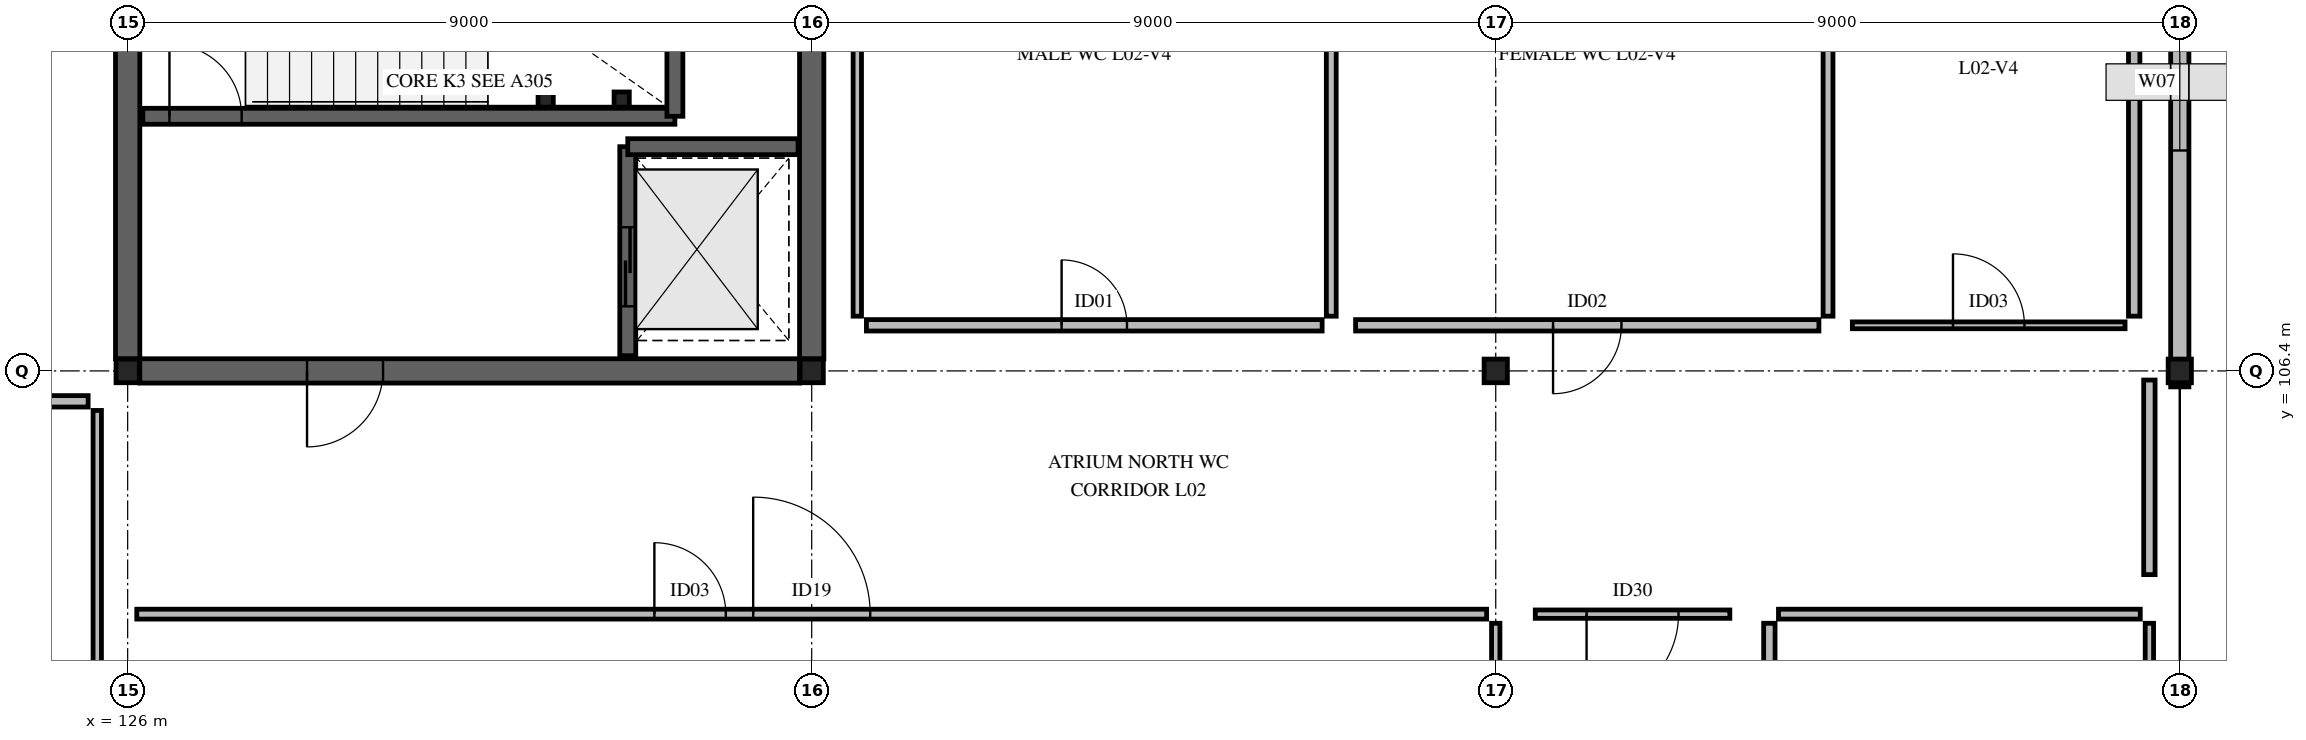
"""IFC4 building model, lengths in metres.
Left out: names, types, materials, properties, quantities, classifications, styles, units other than length and angle.
Written with IfcOpenShell. Run it as: python <this file> out.ifc"""

import sys

from ifc_helpers import new_model, si_unit, direction, frame, frame_2d, origin, origin_2d, place, context, subcontext, project, spatial, rectangle, hollow_rectangle, i_section, extrude, element, fill, save


model = new_model("IFC4")
c1 = context("Model", 3, precision=1e-05, world=origin(), true_north=direction((0.0, 1.0)))
c2 = subcontext(c1, "Body", "Model", "MODEL_VIEW")
j1 = project(units=[si_unit("LENGTHUNIT", "METRE"), si_unit("PLANEANGLEUNIT", "RADIAN")], contexts=[c1])
p1 = place(None, origin())
s1 = spatial("IfcSite", under=j1, at=p1, CompositionType="ELEMENT")
p2 = place(p1, origin())
s2 = spatial("IfcBuilding", under=s1, at=p2, CompositionType="ELEMENT")
p3 = place(p2, frame((0.0, 0.0, 9.36)))
s3 = spatial("IfcBuildingStorey", under=s2, at=p3, CompositionType="ELEMENT", Elevation=9.36)
for number, where, z_axis, x_axis in (
    (1, (126.0, 106.4, 0.0), (0.0, 0.0, 1.0), (1.0, 0.0, 0.0)),
    (2, (135.0, 106.4, 0.0), (0.0, 0.0, 1.0), (1.0, 0.0, 0.0)),
    (3, (144.0, 106.4, 0.0), (0.0, 0.0, 1.0), (1.0, 0.0, 0.0)),
    (4, (153.0, 106.4, 0.0), (0.0, 0.0, 1.0), (1.0, 0.0, 0.0)),
):
    element("IfcColumn", number, at=place(p3, frame(where, z_axis=z_axis, x_axis=x_axis)), inside=s3, PredefinedType="COLUMN", context=c2, shape_type="SweptSolid", body=[
        extrude(i_section(OverallWidth=0.306, OverallDepth=0.311, WebThickness=0.011, FlangeThickness=0.017, FilletRadius=0.015, at=origin_2d()), origin(), (0.0, 0.0, 1.0), 4.32),
    ])
p4 = place(p3, frame((153.0, 106.19, 0.0), z_axis=(0.0, 0.0, 1.0), x_axis=(0.0, 1.0, 0.0)))
e5 = element("IfcWall", 5, at=p4, inside=s3, PredefinedType="STANDARD", context=c2, shape_type="SweptSolid", body=[
    extrude(rectangle(XDim=7.81, YDim=0.24, at=frame_2d((3.905, 0.0))), origin(), (0.0, 0.0, 1.0), 3.788),
])
p5 = place(p4, frame((3.11, 0.0, 0.85)))
e6 = element("IfcOpeningElement", 6, at=p5, cuts=e5, PredefinedType="OPENING", context=c2, shape_type="SweptSolid", body=[
    extrude(rectangle(XDim=1.8, YDim=1.2, at=frame_2d((0.9, 0.6))), frame((0.0, 0.13, 0.0), z_axis=(0.0, -1.0, 0.0), x_axis=(1.0, 0.0, 0.0)), (0.0, 0.0, 1.0), 0.26),
])
p6 = place(p3, frame((126.16, 106.4, 0.0), z_axis=(0.0, 0.0, 1.0), x_axis=(1.0, 0.0, 0.0)))
e7 = element("IfcWall", 7, at=p6, inside=s3, PredefinedType="SHEAR", context=c2, shape_type="SweptSolid", body=[
    extrude(rectangle(XDim=8.68, YDim=0.32, at=frame_2d((4.34, 0.0))), origin(), (0.0, 0.0, 1.0), 4.04),
])
p7 = place(p6, frame((2.2, 0.0, 0.0)))
e8 = element("IfcOpeningElement", 8, at=p7, cuts=e7, PredefinedType="OPENING", context=c2, shape_type="SweptSolid", body=[
    extrude(rectangle(XDim=1.0, YDim=2.15, at=frame_2d((0.5, 1.075))), frame((0.0, 0.17, 0.0), z_axis=(0.0, -1.0, 0.0), x_axis=(1.0, 0.0, 0.0)), (0.0, 0.0, 1.0), 0.34),
])
for number, where, z_axis, x_axis in (
    (9, (126.0, 106.56, 0.0), (0.0, 0.0, 1.0), (0.0, 1.0, 0.0)),
    (10, (135.0, 106.56, 0.0), (0.0, 0.0, 1.0), (0.0, 1.0, 0.0)),
):
    element("IfcWall", number, at=place(p3, frame(where, z_axis=z_axis, x_axis=x_axis)), inside=s3, PredefinedType="SHEAR", context=c2, shape_type="SweptSolid", body=[
        extrude(rectangle(XDim=7.28, YDim=0.32, at=frame_2d((3.64, 0.0))), origin(), (0.0, 0.0, 1.0), 4.04),
    ])
p8 = place(p3, frame((126.2, 109.75, 0.0), z_axis=(0.0, 0.0, 1.0), x_axis=(1.0, 0.0, 0.0)))
e11 = element("IfcWall", 11, at=p8, inside=s3, PredefinedType="SOLIDWALL", context=c2, shape_type="SweptSolid", body=[
    extrude(rectangle(XDim=7.0, YDim=0.21, at=frame_2d((3.5, 0.0))), origin(), (0.0, 0.0, 1.0), 4.04),
])
p9 = place(p8, frame((0.35, 0.0, 0.0)))
e12 = element("IfcOpeningElement", 12, at=p9, cuts=e11, PredefinedType="OPENING", context=c2, shape_type="SweptSolid", body=[
    extrude(rectangle(XDim=0.95, YDim=2.12, at=frame_2d((0.475, 1.06))), frame((0.0, 0.115, 0.0), z_axis=(0.0, -1.0, 0.0), x_axis=(1.0, 0.0, 0.0)), (0.0, 0.0, 1.0), 0.23),
])
p10 = place(p3, frame((133.2, 109.75, 0.0), z_axis=(0.0, 0.0, 1.0), x_axis=(0.0, 1.0, 0.0)))
e13 = element("IfcWall", 13, at=p10, inside=s3, PredefinedType="SOLIDWALL", context=c2, shape_type="SweptSolid", body=[
    extrude(rectangle(XDim=4.05, YDim=0.21, at=frame_2d((2.025, 0.0))), origin(), (0.0, 0.0, 1.0), 4.04),
])
p11 = place(p3, frame((132.58, 106.6, 0.0), z_axis=(0.0, 0.0, 1.0), x_axis=(0.0, 1.0, 0.0)))
e14 = element("IfcWall", 14, at=p11, inside=s3, PredefinedType="SOLIDWALL", context=c2, shape_type="SweptSolid", body=[
    extrude(rectangle(XDim=2.75, YDim=0.21, at=frame_2d((1.375, 0.0))), origin(), (0.0, 0.0, 1.0), 4.04),
])
p12 = place(p11, frame((0.65, 0.0, 0.0)))
e15 = element("IfcOpeningElement", 15, at=p12, cuts=e14, PredefinedType="OPENING", context=c2, shape_type="SweptSolid", body=[
    extrude(rectangle(XDim=1.04, YDim=2.1, at=frame_2d((0.52, 1.05))), frame((0.0, 0.115, 0.0), z_axis=(0.0, -1.0, 0.0), x_axis=(1.0, 0.0, 0.0)), (0.0, 0.0, 1.0), 0.23),
])
p13 = place(p3, frame((132.58, 109.35, 0.0), z_axis=(0.0, 0.0, 1.0), x_axis=(1.0, 0.0, 0.0)))
e16 = element("IfcWall", 16, at=p13, inside=s3, PredefinedType="SOLIDWALL", context=c2, shape_type="SweptSolid", body=[
    extrude(rectangle(XDim=2.24, YDim=0.21, at=frame_2d((1.12, 0.0))), origin(), (0.0, 0.0, 1.0), 4.04),
])
for number, where, z_axis, x_axis in (
    (17, (131.5, 109.97, 0.0), (0.0, 0.0, 1.0), (1.0, 0.0, 0.0)),
    (18, (132.5, 109.97, 0.0), (0.0, 0.0, 1.0), (1.0, 0.0, 0.0)),
):
    element("IfcColumn", number, at=place(p3, frame(where, z_axis=z_axis, x_axis=x_axis)), inside=s3, PredefinedType="COLUMN", context=c2, shape_type="SweptSolid", body=[
        extrude(hollow_rectangle(XDim=0.2, YDim=0.2, WallThickness=0.012, at=origin_2d()), origin(), (0.0, 0.0, 1.0), 4.32),
    ])
p14 = place(p3, frame((125.6, 76.12, 0.0), z_axis=(0.0, 0.0, 1.0), x_axis=(0.0, 1.0, 0.0)))
e19 = element("IfcWall", 19, at=p14, inside=s3, PredefinedType="PARTITIONING", context=c2, shape_type="SweptSolid", body=[
    extrude(rectangle(XDim=29.76, YDim=0.11, at=frame_2d((14.88, 0.0))), origin(), (0.0, 0.0, 1.0), 4.04),
])
p15 = place(p14, frame((12.55, 0.0, 0.0)))
e20 = element("IfcOpeningElement", 20, at=p15, cuts=e19, PredefinedType="OPENING", context=c2, shape_type="SweptSolid", body=[
    extrude(rectangle(XDim=1.46, YDim=2.1, at=frame_2d((0.73, 1.05))), frame((0.0, 0.065, 0.0), z_axis=(0.0, -1.0, 0.0), x_axis=(1.0, 0.0, 0.0)), (0.0, 0.0, 1.0), 0.13),
])
p16 = place(p3, frame((115.12, 106.0, 0.0), z_axis=(0.0, 0.0, 1.0), x_axis=(1.0, 0.0, 0.0)))
e21 = element("IfcWall", 21, at=p16, inside=s3, PredefinedType="PARTITIONING", context=c2, shape_type="SweptSolid", body=[
    extrude(rectangle(XDim=10.36, YDim=0.15, at=frame_2d((5.18, 0.0))), origin(), (0.0, 0.0, 1.0), 4.04),
])
p17 = place(p3, frame((126.12, 103.2, 0.0), z_axis=(0.0, 0.0, 1.0), x_axis=(1.0, 0.0, 0.0)))
e22 = element("IfcWall", 22, at=p17, inside=s3, PredefinedType="PARTITIONING", context=c2, shape_type="SweptSolid", body=[
    extrude(rectangle(XDim=17.76, YDim=0.13, at=frame_2d((8.88, 0.0))), origin(), (0.0, 0.0, 1.0), 4.04),
])
p18 = place(p17, frame((8.11, 0.0, 0.0)))
e23 = element("IfcOpeningElement", 23, at=p18, cuts=e22, PredefinedType="OPENING", context=c2, shape_type="SweptSolid", body=[
    extrude(rectangle(XDim=1.54, YDim=2.1, at=frame_2d((0.77, 1.05))), frame((0.0, 0.075, 0.0), z_axis=(0.0, -1.0, 0.0), x_axis=(1.0, 0.0, 0.0)), (0.0, 0.0, 1.0), 0.15),
])
p19 = place(p17, frame((6.81, 0.0, 0.0)))
e24 = element("IfcOpeningElement", 24, at=p19, cuts=e22, PredefinedType="OPENING", context=c2, shape_type="SweptSolid", body=[
    extrude(rectangle(XDim=0.94, YDim=2.06, at=frame_2d((0.47, 1.03))), frame((0.0, 0.075, 0.0), z_axis=(0.0, -1.0, 0.0), x_axis=(1.0, 0.0, 0.0)), (0.0, 0.0, 1.0), 0.15),
])
p20 = place(p3, frame((144.0, 91.72, 0.0), z_axis=(0.0, 0.0, 1.0), x_axis=(0.0, 1.0, 0.0)))
e25 = element("IfcWall", 25, at=p20, inside=s3, PredefinedType="PARTITIONING", context=c2, shape_type="SweptSolid", body=[
    extrude(rectangle(XDim=11.36, YDim=0.11, at=frame_2d((5.68, 0.0))), origin(), (0.0, 0.0, 1.0), 3.631),
])
p21 = place(p3, frame((147.6, 61.32, 0.0), z_axis=(0.0, 0.0, 1.0), x_axis=(0.0, 1.0, 0.0)))
e26 = element("IfcWall", 26, at=p21, inside=s3, PredefinedType="PARTITIONING", context=c2, shape_type="SweptSolid", body=[
    extrude(rectangle(XDim=41.76, YDim=0.15, at=frame_2d((20.88, 0.0))), origin(), (0.0, 0.0, 1.0), 4.04),
])
p22 = place(p21, frame((20.06, 0.0, 0.0)))
e27 = element("IfcOpeningElement", 27, at=p22, cuts=e26, PredefinedType="OPENING", context=c2, shape_type="SweptSolid", body=[
    extrude(rectangle(XDim=1.0, YDim=2.15, at=frame_2d((0.5, 1.075))), frame((0.0, 0.085, 0.0), z_axis=(0.0, -1.0, 0.0), x_axis=(1.0, 0.0, 0.0)), (0.0, 0.0, 1.0), 0.17),
])
p23 = place(p3, frame((147.72, 103.2, 0.0), z_axis=(0.0, 0.0, 1.0), x_axis=(1.0, 0.0, 0.0)))
e28 = element("IfcWall", 28, at=p23, inside=s3, PredefinedType="PARTITIONING", context=c2, shape_type="SweptSolid", body=[
    extrude(rectangle(XDim=4.76, YDim=0.13, at=frame_2d((2.38, 0.0))), origin(), (0.0, 0.0, 1.0), 4.04),
])
p24 = place(p3, frame((152.6, 61.32, 0.0), z_axis=(0.0, 0.0, 1.0), x_axis=(0.0, 1.0, 0.0)))
e29 = element("IfcWall", 29, at=p24, inside=s3, PredefinedType="PARTITIONING", context=c2, shape_type="SweptSolid", body=[
    extrude(rectangle(XDim=41.76, YDim=0.11, at=frame_2d((20.88, 0.0))), origin(), (0.0, 0.0, 1.0), 4.04),
])
p25 = place(p3, frame((135.72, 107.0, 0.0), z_axis=(0.0, 0.0, 1.0), x_axis=(1.0, 0.0, 0.0)))
e30 = element("IfcWall", 30, at=p25, inside=s3, PredefinedType="PARTITIONING", context=c2, shape_type="SweptSolid", body=[
    extrude(rectangle(XDim=5.996, YDim=0.15, at=frame_2d((2.998, 0.0))), origin(), (0.0, 0.0, 1.0), 4.04),
])
p26 = place(p25, frame((2.568, 0.0, 0.0)))
e31 = element("IfcOpeningElement", 31, at=p26, cuts=e30, PredefinedType="OPENING", context=c2, shape_type="SweptSolid", body=[
    extrude(rectangle(XDim=0.86, YDim=2.06, at=frame_2d((0.43, 1.03))), frame((0.0, 0.085, 0.0), z_axis=(0.0, -1.0, 0.0), x_axis=(1.0, 0.0, 0.0)), (0.0, 0.0, 1.0), 0.17),
])
p27 = place(p3, frame((141.836, 107.12, 0.0), z_axis=(0.0, 0.0, 1.0), x_axis=(0.0, 1.0, 0.0)))
e32 = element("IfcWall", 32, at=p27, inside=s3, PredefinedType="PARTITIONING", context=c2, shape_type="SweptSolid", body=[
    extrude(rectangle(XDim=6.16, YDim=0.13, at=frame_2d((3.08, 0.0))), origin(), (0.0, 0.0, 1.0), 4.04),
])
p28 = place(p3, frame((135.6, 107.12, 0.0), z_axis=(0.0, 0.0, 1.0), x_axis=(0.0, 1.0, 0.0)))
e33 = element("IfcWall", 33, at=p28, inside=s3, PredefinedType="PARTITIONING", context=c2, shape_type="SweptSolid", body=[
    extrude(rectangle(XDim=6.16, YDim=0.11, at=frame_2d((3.08, 0.0))), origin(), (0.0, 0.0, 1.0), 4.04),
])
p29 = place(p3, frame((142.156, 107.0, 0.0), z_axis=(0.0, 0.0, 1.0), x_axis=(1.0, 0.0, 0.0)))
e34 = element("IfcWall", 34, at=p29, inside=s3, PredefinedType="PARTITIONING", context=c2, shape_type="SweptSolid", body=[
    extrude(rectangle(XDim=6.096, YDim=0.15, at=frame_2d((3.048, 0.0))), origin(), (0.0, 0.0, 1.0), 4.04),
])
p30 = place(p29, frame((2.598, 0.0, 0.0)))
e35 = element("IfcOpeningElement", 35, at=p30, cuts=e34, PredefinedType="OPENING", context=c2, shape_type="SweptSolid", body=[
    extrude(rectangle(XDim=0.9, YDim=2.06, at=frame_2d((0.45, 1.03))), frame((0.0, 0.085, 0.0), z_axis=(0.0, -1.0, 0.0), x_axis=(1.0, 0.0, 0.0)), (0.0, 0.0, 1.0), 0.17),
])
p31 = place(p3, frame((148.372, 107.12, 0.0), z_axis=(0.0, 0.0, 1.0), x_axis=(0.0, 1.0, 0.0)))
e36 = element("IfcWall", 36, at=p31, inside=s3, PredefinedType="PARTITIONING", context=c2, shape_type="SweptSolid", body=[
    extrude(rectangle(XDim=6.16, YDim=0.13, at=frame_2d((3.08, 0.0))), origin(), (0.0, 0.0, 1.0), 4.04),
])
p32 = place(p3, frame((148.692, 107.0, 0.0), z_axis=(0.0, 0.0, 1.0), x_axis=(1.0, 0.0, 0.0)))
e37 = element("IfcWall", 37, at=p32, inside=s3, PredefinedType="PARTITIONING", context=c2, shape_type="SweptSolid", body=[
    extrude(rectangle(XDim=3.588, YDim=0.09, at=frame_2d((1.794, 0.0))), origin(), (0.0, 0.0, 1.0), 4.04),
])
p33 = place(p32, frame((1.324, 0.0, 0.0)))
e38 = element("IfcOpeningElement", 38, at=p33, cuts=e37, PredefinedType="OPENING", context=c2, shape_type="SweptSolid", body=[
    extrude(rectangle(XDim=0.94, YDim=2.06, at=frame_2d((0.47, 1.03))), frame((0.0, 0.055, 0.0), z_axis=(0.0, -1.0, 0.0), x_axis=(1.0, 0.0, 0.0)), (0.0, 0.0, 1.0), 0.11),
])
p34 = place(p3, frame((152.4, 107.12, 0.0), z_axis=(0.0, 0.0, 1.0), x_axis=(0.0, 1.0, 0.0)))
e39 = element("IfcWall", 39, at=p34, inside=s3, PredefinedType="PARTITIONING", context=c2, shape_type="SweptSolid", body=[
    extrude(rectangle(XDim=6.16, YDim=0.15, at=frame_2d((3.08, 0.0))), origin(), (0.0, 0.0, 1.0), 4.04),
])
p35 = place(p3, frame((144.52, 103.2, 0.0), z_axis=(0.0, 0.0, 1.0), x_axis=(1.0, 0.0, 0.0)))
e40 = element("IfcWall", 40, at=p35, inside=s3, PredefinedType="PARTITIONING", context=c2, shape_type="SweptSolid", body=[
    extrude(rectangle(XDim=2.56, YDim=0.11, at=frame_2d((1.28, 0.0))), origin(), (0.0, 0.0, 1.0), 4.04),
])
p36 = place(p35, frame((0.675, 0.0, 0.0)))
e41 = element("IfcOpeningElement", 41, at=p36, cuts=e40, PredefinedType="OPENING", context=c2, shape_type="SweptSolid", body=[
    extrude(rectangle(XDim=1.21, YDim=2.15, at=frame_2d((0.605, 1.075))), frame((0.0, 0.065, 0.0), z_axis=(0.0, -1.0, 0.0), x_axis=(1.0, 0.0, 0.0)), (0.0, 0.0, 1.0), 0.13),
])
p37 = place(p3, frame((152.6, 103.72, 0.0), z_axis=(0.0, 0.0, 1.0), x_axis=(0.0, 1.0, 0.0)))
e42 = element("IfcWall", 42, at=p37, inside=s3, PredefinedType="PARTITIONING", context=c2, shape_type="SweptSolid", body=[
    extrude(rectangle(XDim=2.56, YDim=0.15, at=frame_2d((1.28, 0.0))), origin(), (0.0, 0.0, 1.0), 4.04),
])
p38 = place(p5, origin())
e43 = element("IfcWindow", 43, at=p38, inside=s3, PartitioningType="SINGLE_PANEL", PredefinedType="WINDOW", context=c2, shape_type="SweptSolid", body=[
    extrude(rectangle(XDim=1.8, YDim=1.2, at=frame_2d((0.9, 0.6))), frame((0.0, 0.03, 0.0), z_axis=(0.0, -1.0, 0.0), x_axis=(1.0, 0.0, 0.0)), (0.0, 0.0, 1.0), 0.06),
])
fill(e6, e43)
p39 = place(p9, origin())
e44 = element("IfcDoor", 44, at=p39, inside=s3, OperationType="SINGLE_SWING_LEFT", PredefinedType="DOOR", context=c2, shape_type="SweptSolid", body=[
    extrude(rectangle(XDim=0.95, YDim=2.12, at=frame_2d((0.475, 1.06))), frame((0.0, 0.025, 0.0), z_axis=(0.0, -1.0, 0.0), x_axis=(1.0, 0.0, 0.0)), (0.0, 0.0, 1.0), 0.05),
])
fill(e12, e44)
p40 = place(p12, origin())
e45 = element("IfcDoor", 45, at=p40, inside=s3, OperationType="SLIDING_TO_LEFT", PredefinedType="DOOR", context=c2, shape_type="SweptSolid", body=[
    extrude(rectangle(XDim=1.04, YDim=2.1, at=frame_2d((0.52, 1.05))), frame((0.0, 0.025, 0.0), z_axis=(0.0, -1.0, 0.0), x_axis=(1.0, 0.0, 0.0)), (0.0, 0.0, 1.0), 0.05),
])
fill(e15, e45)
p41 = place(p7, origin())
e46 = element("IfcDoor", 46, at=p41, inside=s3, OperationType="SINGLE_SWING_RIGHT", PredefinedType="DOOR", context=c2, shape_type="SweptSolid", body=[
    extrude(rectangle(XDim=1.0, YDim=2.15, at=frame_2d((0.5, 1.075))), frame((0.0, 0.025, 0.0), z_axis=(0.0, -1.0, 0.0), x_axis=(1.0, 0.0, 0.0)), (0.0, 0.0, 1.0), 0.05),
])
fill(e8, e46)
p42 = place(p18, origin())
e47 = element("IfcDoor", 47, at=p42, inside=s3, OperationType="SINGLE_SWING_LEFT", PredefinedType="DOOR", context=c2, shape_type="SweptSolid", body=[
    extrude(rectangle(XDim=1.54, YDim=2.1, at=frame_2d((0.77, 1.05))), frame((0.0, 0.025, 0.0), z_axis=(0.0, -1.0, 0.0), x_axis=(1.0, 0.0, 0.0)), (0.0, 0.0, 1.0), 0.05),
])
fill(e23, e47)
p43 = place(p26, origin())
e48 = element("IfcDoor", 48, at=p43, inside=s3, OperationType="SINGLE_SWING_LEFT", PredefinedType="DOOR", context=c2, shape_type="SweptSolid", body=[
    extrude(rectangle(XDim=0.86, YDim=2.06, at=frame_2d((0.43, 1.03))), frame((0.0, 0.025, 0.0), z_axis=(0.0, -1.0, 0.0), x_axis=(1.0, 0.0, 0.0)), (0.0, 0.0, 1.0), 0.05),
])
fill(e31, e48)
p44 = place(p30, origin())
e49 = element("IfcDoor", 49, at=p44, inside=s3, OperationType="SINGLE_SWING_RIGHT", PredefinedType="DOOR", context=c2, shape_type="SweptSolid", body=[
    extrude(rectangle(XDim=0.9, YDim=2.06, at=frame_2d((0.45, 1.03))), frame((0.0, 0.025, 0.0), z_axis=(0.0, -1.0, 0.0), x_axis=(1.0, 0.0, 0.0)), (0.0, 0.0, 1.0), 0.05),
])
fill(e35, e49)
p45 = place(p33, origin())
e50 = element("IfcDoor", 50, at=p45, inside=s3, OperationType="SINGLE_SWING_LEFT", PredefinedType="DOOR", context=c2, shape_type="SweptSolid", body=[
    extrude(rectangle(XDim=0.94, YDim=2.06, at=frame_2d((0.47, 1.03))), frame((0.0, 0.025, 0.0), z_axis=(0.0, -1.0, 0.0), x_axis=(1.0, 0.0, 0.0)), (0.0, 0.0, 1.0), 0.05),
])
fill(e38, e50)
p46 = place(p36, origin())
e51 = element("IfcDoor", 51, at=p46, inside=s3, OperationType="SINGLE_SWING_RIGHT", PredefinedType="DOOR", context=c2, shape_type="SweptSolid", body=[
    extrude(rectangle(XDim=1.21, YDim=2.15, at=frame_2d((0.605, 1.075))), frame((0.0, 0.025, 0.0), z_axis=(0.0, -1.0, 0.0), x_axis=(1.0, 0.0, 0.0)), (0.0, 0.0, 1.0), 0.05),
])
fill(e41, e51)
p47 = place(p19, origin())
e52 = element("IfcDoor", 52, at=p47, inside=s3, OperationType="SINGLE_SWING_LEFT", PredefinedType="DOOR", context=c2, shape_type="SweptSolid", body=[
    extrude(rectangle(XDim=0.94, YDim=2.06, at=frame_2d((0.47, 1.03))), frame((0.0, 0.025, 0.0), z_axis=(0.0, -1.0, 0.0), x_axis=(1.0, 0.0, 0.0)), (0.0, 0.0, 1.0), 0.05),
])
fill(e24, e52)
save(model, sys.argv[1])
